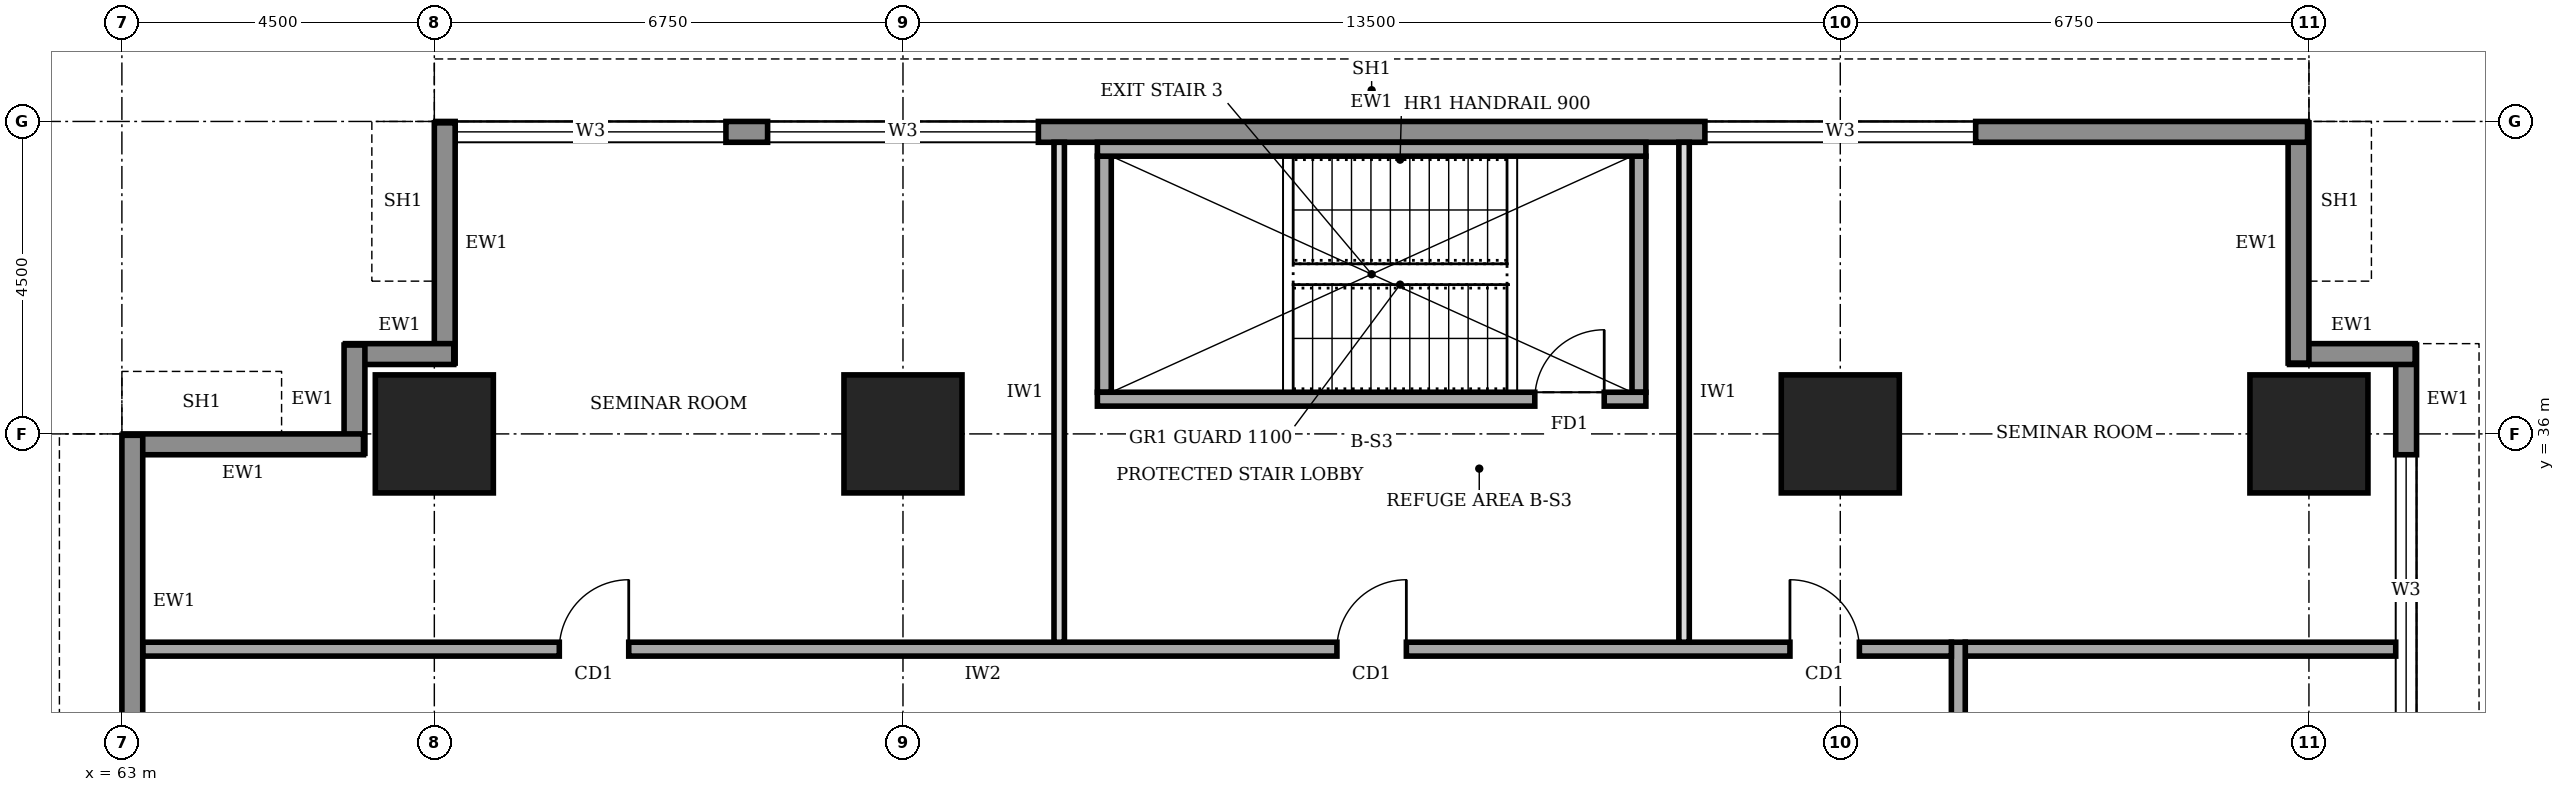
"""IFC4 building model, lengths in metres.
Left out: names, types, materials, properties, quantities, classifications, styles, units other than length and angle.
Written with IfcOpenShell. Run it as: python <this file> out.ifc"""

import sys

from ifc_helpers import new_model, si_unit, direction, frame, frame_2d, origin, origin_2d, place, context, subcontext, project, spatial, rectangle, extrude, element, fill, save


model = new_model("IFC4")
c1 = context("Model", 3, precision=1e-05, world=origin(), true_north=direction((0.0, 1.0)))
c2 = subcontext(c1, "Body", "Model", "MODEL_VIEW")
j1 = project(units=[si_unit("LENGTHUNIT", "METRE"), si_unit("PLANEANGLEUNIT", "RADIAN")], contexts=[c1])
p1 = place(None, origin())
s1 = spatial("IfcSite", under=j1, at=p1, CompositionType="ELEMENT")
p2 = place(p1, origin())
s2 = spatial("IfcBuilding", under=s1, at=p2, CompositionType="ELEMENT")
p3 = place(p2, frame((0.0, 0.0, 89.0)))
s3 = spatial("IfcBuildingStorey", under=s2, at=p3, CompositionType="ELEMENT", Elevation=89.0)
for number, where, z_axis, x_axis in (
    (1, (67.5, 36.0, 0.0), (0.0, 0.0, 1.0), (1.0, 0.0, 0.0)),
    (2, (74.25, 36.0, 0.0), (0.0, 0.0, 1.0), (1.0, 0.0, 0.0)),
    (3, (87.75, 36.0, 0.0), (0.0, 0.0, 1.0), (1.0, 0.0, 0.0)),
    (4, (94.5, 36.0, 0.0), (0.0, 0.0, 1.0), (1.0, 0.0, 0.0)),
):
    element("IfcColumn", number, at=place(p3, frame(where, z_axis=z_axis, x_axis=x_axis)), inside=s3, PredefinedType="COLUMN", context=c2, shape_type="SweptSolid", body=[
        extrude(rectangle(XDim=1.7, YDim=1.7, at=origin_2d()), origin(), (0.0, 0.0, 1.0), 4.0),
    ])
p4 = place(p3, frame((95.9, 3.32, 0.0), z_axis=(0.0, 0.0, 1.0), x_axis=(0.0, 1.0, 0.0)))
e5 = element("IfcWall", 5, at=p4, inside=s3, PredefinedType="STANDARD", context=c2, shape_type="SweptSolid", body=[
    extrude(rectangle(XDim=33.96, YDim=0.3, at=frame_2d((16.98, 0.0))), origin(), (0.0, 0.0, 1.0), 3.75),
])
p5 = place(p4, frame((1.48, 0.0, 0.95)))
e6 = element("IfcOpeningElement", 6, at=p5, cuts=e5, PredefinedType="OPENING", context=c2, shape_type="SweptSolid", body=[
    extrude(rectangle(XDim=3.9, YDim=1.8, at=frame_2d((1.95, 0.9))), frame((0.0, 0.16, 0.0), z_axis=(0.0, -1.0, 0.0), x_axis=(1.0, 0.0, 0.0)), (0.0, 0.0, 1.0), 0.32),
])
p6 = place(p4, frame((5.98, 0.0, 0.95)))
e7 = element("IfcOpeningElement", 7, at=p6, cuts=e5, PredefinedType="OPENING", context=c2, shape_type="SweptSolid", body=[
    extrude(rectangle(XDim=3.9, YDim=1.8, at=frame_2d((1.95, 0.9))), frame((0.0, 0.16, 0.0), z_axis=(0.0, -1.0, 0.0), x_axis=(1.0, 0.0, 0.0)), (0.0, 0.0, 1.0), 0.32),
])
p7 = place(p4, frame((10.48, 0.0, 0.95)))
e8 = element("IfcOpeningElement", 8, at=p7, cuts=e5, PredefinedType="OPENING", context=c2, shape_type="SweptSolid", body=[
    extrude(rectangle(XDim=3.9, YDim=1.8, at=frame_2d((1.95, 0.9))), frame((0.0, 0.16, 0.0), z_axis=(0.0, -1.0, 0.0), x_axis=(1.0, 0.0, 0.0)), (0.0, 0.0, 1.0), 0.32),
])
p8 = place(p4, frame((14.98, 0.0, 0.95)))
e9 = element("IfcOpeningElement", 9, at=p8, cuts=e5, PredefinedType="OPENING", context=c2, shape_type="SweptSolid", body=[
    extrude(rectangle(XDim=3.9, YDim=1.8, at=frame_2d((1.95, 0.9))), frame((0.0, 0.16, 0.0), z_axis=(0.0, -1.0, 0.0), x_axis=(1.0, 0.0, 0.0)), (0.0, 0.0, 1.0), 0.32),
])
p9 = place(p4, frame((19.48, 0.0, 0.95)))
e10 = element("IfcOpeningElement", 10, at=p9, cuts=e5, PredefinedType="OPENING", context=c2, shape_type="SweptSolid", body=[
    extrude(rectangle(XDim=3.9, YDim=1.8, at=frame_2d((1.95, 0.9))), frame((0.0, 0.16, 0.0), z_axis=(0.0, -1.0, 0.0), x_axis=(1.0, 0.0, 0.0)), (0.0, 0.0, 1.0), 0.32),
])
p10 = place(p4, frame((23.98, 0.0, 0.95)))
e11 = element("IfcOpeningElement", 11, at=p10, cuts=e5, PredefinedType="OPENING", context=c2, shape_type="SweptSolid", body=[
    extrude(rectangle(XDim=3.9, YDim=1.8, at=frame_2d((1.95, 0.9))), frame((0.0, 0.16, 0.0), z_axis=(0.0, -1.0, 0.0), x_axis=(1.0, 0.0, 0.0)), (0.0, 0.0, 1.0), 0.32),
])
p11 = place(p4, frame((28.48, 0.0, 0.95)))
e12 = element("IfcOpeningElement", 12, at=p11, cuts=e5, PredefinedType="OPENING", context=c2, shape_type="SweptSolid", body=[
    extrude(rectangle(XDim=3.9, YDim=1.8, at=frame_2d((1.95, 0.9))), frame((0.0, 0.16, 0.0), z_axis=(0.0, -1.0, 0.0), x_axis=(1.0, 0.0, 0.0)), (0.0, 0.0, 1.0), 0.32),
])
p12 = place(p3, frame((96.03, 37.15, 0.0), z_axis=(0.0, 0.0, 1.0), x_axis=(-1.0, 0.0, 0.0)))
e13 = element("IfcWall", 13, at=p12, inside=s3, PredefinedType="STANDARD", context=c2, shape_type="SweptSolid", body=[
    extrude(rectangle(XDim=1.81, YDim=0.3, at=frame_2d((0.905, 0.0))), origin(), (0.0, 0.0, 1.0), 3.75),
])
p13 = place(p3, frame((94.35, 37.02, 0.0), z_axis=(0.0, 0.0, 1.0), x_axis=(0.0, 1.0, 0.0)))
e14 = element("IfcWall", 14, at=p13, inside=s3, PredefinedType="STANDARD", context=c2, shape_type="SweptSolid", body=[
    extrude(rectangle(XDim=3.46, YDim=0.3, at=frame_2d((1.73, 0.0))), origin(), (0.0, 0.0, 1.0), 2.85),
])
p14 = place(p3, frame((94.48, 40.35, 0.0), z_axis=(0.0, 0.0, 1.0), x_axis=(-1.0, 0.0, 0.0)))
e15 = element("IfcWall", 15, at=p14, inside=s3, PredefinedType="STANDARD", context=c2, shape_type="SweptSolid", body=[
    extrude(rectangle(XDim=26.96, YDim=0.3, at=frame_2d((13.48, 0.0))), origin(), (0.0, 0.0, 1.0), 3.75),
])
p15 = place(p14, frame((22.78, 0.0, 0.95)))
e16 = element("IfcOpeningElement", 16, at=p15, cuts=e15, PredefinedType="OPENING", context=c2, shape_type="SweptSolid", body=[
    extrude(rectangle(XDim=3.9, YDim=1.8, at=frame_2d((1.95, 0.9))), frame((0.0, 0.16, 0.0), z_axis=(0.0, -1.0, 0.0), x_axis=(1.0, 0.0, 0.0)), (0.0, 0.0, 1.0), 0.32),
])
p16 = place(p14, frame((18.28, 0.0, 0.95)))
e17 = element("IfcOpeningElement", 17, at=p16, cuts=e15, PredefinedType="OPENING", context=c2, shape_type="SweptSolid", body=[
    extrude(rectangle(XDim=3.9, YDim=1.8, at=frame_2d((1.95, 0.9))), frame((0.0, 0.16, 0.0), z_axis=(0.0, -1.0, 0.0), x_axis=(1.0, 0.0, 0.0)), (0.0, 0.0, 1.0), 0.32),
])
p17 = place(p14, frame((4.78, 0.0, 0.95)))
e18 = element("IfcOpeningElement", 18, at=p17, cuts=e15, PredefinedType="OPENING", context=c2, shape_type="SweptSolid", body=[
    extrude(rectangle(XDim=3.9, YDim=1.8, at=frame_2d((1.95, 0.9))), frame((0.0, 0.16, 0.0), z_axis=(0.0, -1.0, 0.0), x_axis=(1.0, 0.0, 0.0)), (0.0, 0.0, 1.0), 0.32),
])
p18 = place(p3, frame((67.65, 40.48, 0.0), z_axis=(0.0, 0.0, 1.0), x_axis=(0.0, -1.0, 0.0)))
e19 = element("IfcWall", 19, at=p18, inside=s3, PredefinedType="STANDARD", context=c2, shape_type="SweptSolid", body=[
    extrude(rectangle(XDim=3.46, YDim=0.3, at=frame_2d((1.73, 0.0))), origin(), (0.0, 0.0, 1.0), 2.85),
])
for number, where, z_axis, x_axis in (
    (20, (67.78, 37.15, 0.0), (0.0, 0.0, 1.0), (-1.0, 0.0, 0.0)),
    (21, (66.35, 37.28, 0.0), (0.0, 0.0, 1.0), (0.0, -1.0, 0.0)),
):
    element("IfcWall", number, at=place(p3, frame(where, z_axis=z_axis, x_axis=x_axis)), inside=s3, PredefinedType="STANDARD", context=c2, shape_type="SweptSolid", body=[
        extrude(rectangle(XDim=1.56, YDim=0.3, at=frame_2d((0.78, 0.0))), origin(), (0.0, 0.0, 1.0), 3.75),
    ])
p19 = place(p3, frame((66.48, 35.85, 0.0), z_axis=(0.0, 0.0, 1.0), x_axis=(-1.0, 0.0, 0.0)))
e22 = element("IfcWall", 22, at=p19, inside=s3, PredefinedType="STANDARD", context=c2, shape_type="SweptSolid", body=[
    extrude(rectangle(XDim=3.46, YDim=0.3, at=frame_2d((1.73, 0.0))), origin(), (0.0, 0.0, 1.0), 2.85),
])
p20 = place(p3, frame((63.15, 35.98, 0.0), z_axis=(0.0, 0.0, 1.0), x_axis=(0.0, -1.0, 0.0)))
e23 = element("IfcWall", 23, at=p20, inside=s3, PredefinedType="STANDARD", context=c2, shape_type="SweptSolid", body=[
    extrude(rectangle(XDim=31.46, YDim=0.3, at=frame_2d((15.73, 0.0))), origin(), (0.0, 0.0, 1.0), 3.75),
])
p21 = place(p20, frame((27.28, 0.0, 0.95)))
e24 = element("IfcOpeningElement", 24, at=p21, cuts=e23, PredefinedType="OPENING", context=c2, shape_type="SweptSolid", body=[
    extrude(rectangle(XDim=3.9, YDim=1.8, at=frame_2d((1.95, 0.9))), frame((0.0, 0.16, 0.0), z_axis=(0.0, -1.0, 0.0), x_axis=(1.0, 0.0, 0.0)), (0.0, 0.0, 1.0), 0.32),
])
p22 = place(p20, frame((22.78, 0.0, 0.95)))
e25 = element("IfcOpeningElement", 25, at=p22, cuts=e23, PredefinedType="OPENING", context=c2, shape_type="SweptSolid", body=[
    extrude(rectangle(XDim=3.9, YDim=1.8, at=frame_2d((1.95, 0.9))), frame((0.0, 0.16, 0.0), z_axis=(0.0, -1.0, 0.0), x_axis=(1.0, 0.0, 0.0)), (0.0, 0.0, 1.0), 0.32),
])
p23 = place(p20, frame((18.28, 0.0, 0.95)))
e26 = element("IfcOpeningElement", 26, at=p23, cuts=e23, PredefinedType="OPENING", context=c2, shape_type="SweptSolid", body=[
    extrude(rectangle(XDim=3.9, YDim=1.8, at=frame_2d((1.95, 0.9))), frame((0.0, 0.16, 0.0), z_axis=(0.0, -1.0, 0.0), x_axis=(1.0, 0.0, 0.0)), (0.0, 0.0, 1.0), 0.32),
])
p24 = place(p20, frame((13.78, 0.0, 0.95)))
e27 = element("IfcOpeningElement", 27, at=p24, cuts=e23, PredefinedType="OPENING", context=c2, shape_type="SweptSolid", body=[
    extrude(rectangle(XDim=3.9, YDim=1.8, at=frame_2d((1.95, 0.9))), frame((0.0, 0.16, 0.0), z_axis=(0.0, -1.0, 0.0), x_axis=(1.0, 0.0, 0.0)), (0.0, 0.0, 1.0), 0.32),
])
p25 = place(p20, frame((9.28, 0.0, 0.95)))
e28 = element("IfcOpeningElement", 28, at=p25, cuts=e23, PredefinedType="OPENING", context=c2, shape_type="SweptSolid", body=[
    extrude(rectangle(XDim=3.9, YDim=1.8, at=frame_2d((1.95, 0.9))), frame((0.0, 0.16, 0.0), z_axis=(0.0, -1.0, 0.0), x_axis=(1.0, 0.0, 0.0)), (0.0, 0.0, 1.0), 0.32),
])
p26 = place(p20, frame((4.78, 0.0, 0.95)))
e29 = element("IfcOpeningElement", 29, at=p26, cuts=e23, PredefinedType="OPENING", context=c2, shape_type="SweptSolid", body=[
    extrude(rectangle(XDim=3.9, YDim=1.8, at=frame_2d((1.95, 0.9))), frame((0.0, 0.16, 0.0), z_axis=(0.0, -1.0, 0.0), x_axis=(1.0, 0.0, 0.0)), (0.0, 0.0, 1.0), 0.32),
])
p27 = place(p3, frame((89.45, 7.7, 0.0), z_axis=(0.0, 0.0, 1.0), x_axis=(0.0, 1.0, 0.0)))
e30 = element("IfcWall", 30, at=p27, inside=s3, PredefinedType="SOLIDWALL", context=c2, shape_type="SweptSolid", body=[
    extrude(rectangle(XDim=25.3, YDim=0.2, at=frame_2d((12.65, 0.0))), origin(), (0.0, 0.0, 1.0), 3.75),
])
p28 = place(p27, frame((2.3, 0.0, 0.0)))
e31 = element("IfcOpeningElement", 31, at=p28, cuts=e30, PredefinedType="OPENING", context=c2, shape_type="SweptSolid", body=[
    extrude(rectangle(XDim=1.0, YDim=2.1, at=frame_2d((0.5, 1.05))), frame((0.0, 0.11, 0.0), z_axis=(0.0, -1.0, 0.0), x_axis=(1.0, 0.0, 0.0)), (0.0, 0.0, 1.0), 0.22),
])
p29 = place(p27, frame((6.4, 0.0, 0.0)))
e32 = element("IfcOpeningElement", 32, at=p29, cuts=e30, PredefinedType="OPENING", context=c2, shape_type="SweptSolid", body=[
    extrude(rectangle(XDim=1.0, YDim=2.1, at=frame_2d((0.5, 1.05))), frame((0.0, 0.11, 0.0), z_axis=(0.0, -1.0, 0.0), x_axis=(1.0, 0.0, 0.0)), (0.0, 0.0, 1.0), 0.22),
])
p30 = place(p27, frame((9.5, 0.0, 0.0)))
e33 = element("IfcOpeningElement", 33, at=p30, cuts=e30, PredefinedType="OPENING", context=c2, shape_type="SweptSolid", body=[
    extrude(rectangle(XDim=0.9, YDim=2.1, at=frame_2d((0.45, 1.05))), frame((0.0, 0.11, 0.0), z_axis=(0.0, -1.0, 0.0), x_axis=(1.0, 0.0, 0.0)), (0.0, 0.0, 1.0), 0.22),
])
p31 = place(p27, frame((12.55, 0.0, 0.0)))
e34 = element("IfcOpeningElement", 34, at=p31, cuts=e30, PredefinedType="OPENING", context=c2, shape_type="SweptSolid", body=[
    extrude(rectangle(XDim=0.9, YDim=2.1, at=frame_2d((0.45, 1.05))), frame((0.0, 0.11, 0.0), z_axis=(0.0, -1.0, 0.0), x_axis=(1.0, 0.0, 0.0)), (0.0, 0.0, 1.0), 0.22),
])
p32 = place(p27, frame((17.25, 0.0, 0.0)))
e35 = element("IfcOpeningElement", 35, at=p32, cuts=e30, PredefinedType="OPENING", context=c2, shape_type="SweptSolid", body=[
    extrude(rectangle(XDim=0.9, YDim=2.1, at=frame_2d((0.45, 1.05))), frame((0.0, 0.11, 0.0), z_axis=(0.0, -1.0, 0.0), x_axis=(1.0, 0.0, 0.0)), (0.0, 0.0, 1.0), 0.22),
])
p33 = place(p27, frame((14.6, 0.0, 0.0)))
e36 = element("IfcOpeningElement", 36, at=p33, cuts=e30, PredefinedType="OPENING", context=c2, shape_type="SweptSolid", body=[
    extrude(rectangle(XDim=1.0, YDim=2.1, at=frame_2d((0.5, 1.05))), frame((0.0, 0.11, 0.0), z_axis=(0.0, -1.0, 0.0), x_axis=(1.0, 0.0, 0.0)), (0.0, 0.0, 1.0), 0.22),
])
p34 = place(p27, frame((21.8, 0.0, 0.0)))
e37 = element("IfcOpeningElement", 37, at=p34, cuts=e30, PredefinedType="OPENING", context=c2, shape_type="SweptSolid", body=[
    extrude(rectangle(XDim=1.0, YDim=2.1, at=frame_2d((0.5, 1.05))), frame((0.0, 0.11, 0.0), z_axis=(0.0, -1.0, 0.0), x_axis=(1.0, 0.0, 0.0)), (0.0, 0.0, 1.0), 0.22),
])
p35 = place(p3, frame((89.35, 32.9, 0.0), z_axis=(0.0, 0.0, 1.0), x_axis=(-1.0, 0.0, 0.0)))
e38 = element("IfcWall", 38, at=p35, inside=s3, PredefinedType="SOLIDWALL", context=c2, shape_type="SweptSolid", body=[
    extrude(rectangle(XDim=26.05, YDim=0.2, at=frame_2d((13.025, 0.0))), origin(), (0.0, 0.0, 1.0), 3.75),
])
p36 = place(p35, frame((19.05, 0.0, 0.0)))
e39 = element("IfcOpeningElement", 39, at=p36, cuts=e38, PredefinedType="OPENING", context=c2, shape_type="SweptSolid", body=[
    extrude(rectangle(XDim=1.0, YDim=2.1, at=frame_2d((0.5, 1.05))), frame((0.0, 0.11, 0.0), z_axis=(0.0, -1.0, 0.0), x_axis=(1.0, 0.0, 0.0)), (0.0, 0.0, 1.0), 0.22),
])
p37 = place(p35, frame((7.85, 0.0, 0.0)))
e40 = element("IfcOpeningElement", 40, at=p37, cuts=e38, PredefinedType="OPENING", context=c2, shape_type="SweptSolid", body=[
    extrude(rectangle(XDim=1.0, YDim=2.1, at=frame_2d((0.5, 1.05))), frame((0.0, 0.11, 0.0), z_axis=(0.0, -1.0, 0.0), x_axis=(1.0, 0.0, 0.0)), (0.0, 0.0, 1.0), 0.22),
])
p38 = place(p35, frame((1.325, 0.0, 0.0)))
e41 = element("IfcOpeningElement", 41, at=p38, cuts=e38, PredefinedType="OPENING", context=c2, shape_type="SweptSolid", body=[
    extrude(rectangle(XDim=1.0, YDim=2.1, at=frame_2d((0.5, 1.05))), frame((0.0, 0.11, 0.0), z_axis=(0.0, -1.0, 0.0), x_axis=(1.0, 0.0, 0.0)), (0.0, 0.0, 1.0), 0.22),
])
p39 = place(p3, frame((89.55, 32.9, 0.0), z_axis=(0.0, 0.0, 1.0), x_axis=(1.0, 0.0, 0.0)))
e42 = element("IfcWall", 42, at=p39, inside=s3, PredefinedType="SOLIDWALL", context=c2, shape_type="SweptSolid", body=[
    extrude(rectangle(XDim=6.2, YDim=0.2, at=frame_2d((3.1, 0.0))), origin(), (0.0, 0.0, 1.0), 3.75),
])
for number, where, z_axis, x_axis in (
    (43, (76.5, 33.0, 0.0), (0.0, 0.0, 1.0), (0.0, 1.0, 0.0)),
    (44, (85.5, 33.0, 0.0), (0.0, 0.0, 1.0), (0.0, 1.0, 0.0)),
):
    element("IfcWall", number, at=place(p3, frame(where, z_axis=z_axis, x_axis=x_axis)), inside=s3, PredefinedType="PARTITIONING", context=c2, shape_type="SweptSolid", body=[
        extrude(rectangle(XDim=7.2, YDim=0.15, at=frame_2d((3.6, 0.0))), origin(), (0.0, 0.0, 1.0), 3.75),
    ])
p40 = place(p3, frame((77.05, 36.5, 0.0), z_axis=(0.0, 0.0, 1.0), x_axis=(1.0, 0.0, 0.0)))
e45 = element("IfcWall", 45, at=p40, inside=s3, PredefinedType="SOLIDWALL", context=c2, shape_type="SweptSolid", body=[
    extrude(rectangle(XDim=7.9, YDim=0.2, at=frame_2d((3.95, 0.0))), origin(), (0.0, 0.0, 1.0), 3.75),
])
p41 = place(p40, frame((6.3, 0.0, 0.0)))
e46 = element("IfcOpeningElement", 46, at=p41, cuts=e45, PredefinedType="OPENING", context=c2, shape_type="SweptSolid", body=[
    extrude(rectangle(XDim=1.0, YDim=2.1, at=frame_2d((0.5, 1.05))), frame((0.0, 0.11, 0.0), z_axis=(0.0, -1.0, 0.0), x_axis=(1.0, 0.0, 0.0)), (0.0, 0.0, 1.0), 0.22),
])
p42 = place(p3, frame((77.05, 40.1, 0.0), z_axis=(0.0, 0.0, 1.0), x_axis=(1.0, 0.0, 0.0)))
e47 = element("IfcWall", 47, at=p42, inside=s3, PredefinedType="SOLIDWALL", context=c2, shape_type="SweptSolid", body=[
    extrude(rectangle(XDim=7.9, YDim=0.2, at=frame_2d((3.95, 0.0))), origin(), (0.0, 0.0, 1.0), 3.75),
])
for number, where, z_axis, x_axis in (
    (48, (77.15, 36.6, 0.0), (0.0, 0.0, 1.0), (0.0, 1.0, 0.0)),
    (49, (84.85, 36.6, 0.0), (0.0, 0.0, 1.0), (0.0, 1.0, 0.0)),
):
    element("IfcWall", number, at=place(p3, frame(where, z_axis=z_axis, x_axis=x_axis)), inside=s3, PredefinedType="SOLIDWALL", context=c2, shape_type="SweptSolid", body=[
        extrude(rectangle(XDim=3.4, YDim=0.2, at=frame_2d((1.7, 0.0))), origin(), (0.0, 0.0, 1.0), 3.75),
    ])
p43 = place(p11, origin())
e50 = element("IfcWindow", 50, at=p43, inside=s3, PartitioningType="SINGLE_PANEL", PredefinedType="WINDOW", context=c2, shape_type="SweptSolid", body=[
    extrude(rectangle(XDim=3.9, YDim=1.8, at=frame_2d((1.95, 0.9))), frame((0.0, 0.03, 0.0), z_axis=(0.0, -1.0, 0.0), x_axis=(1.0, 0.0, 0.0)), (0.0, 0.0, 1.0), 0.06),
])
fill(e12, e50)
p44 = place(p15, origin())
e51 = element("IfcWindow", 51, at=p44, inside=s3, PartitioningType="SINGLE_PANEL", PredefinedType="WINDOW", context=c2, shape_type="SweptSolid", body=[
    extrude(rectangle(XDim=3.9, YDim=1.8, at=frame_2d((1.95, 0.9))), frame((0.0, 0.03, 0.0), z_axis=(0.0, -1.0, 0.0), x_axis=(1.0, 0.0, 0.0)), (0.0, 0.0, 1.0), 0.06),
])
fill(e16, e51)
p45 = place(p16, origin())
e52 = element("IfcWindow", 52, at=p45, inside=s3, PartitioningType="SINGLE_PANEL", PredefinedType="WINDOW", context=c2, shape_type="SweptSolid", body=[
    extrude(rectangle(XDim=3.9, YDim=1.8, at=frame_2d((1.95, 0.9))), frame((0.0, 0.03, 0.0), z_axis=(0.0, -1.0, 0.0), x_axis=(1.0, 0.0, 0.0)), (0.0, 0.0, 1.0), 0.06),
])
fill(e17, e52)
p46 = place(p17, origin())
e53 = element("IfcWindow", 53, at=p46, inside=s3, PartitioningType="SINGLE_PANEL", PredefinedType="WINDOW", context=c2, shape_type="SweptSolid", body=[
    extrude(rectangle(XDim=3.9, YDim=1.8, at=frame_2d((1.95, 0.9))), frame((0.0, 0.03, 0.0), z_axis=(0.0, -1.0, 0.0), x_axis=(1.0, 0.0, 0.0)), (0.0, 0.0, 1.0), 0.06),
])
fill(e18, e53)
p47 = place(p36, frame((1.0, 0.0, 0.0), z_axis=(0.0, 0.0, 1.0), x_axis=(-1.0, 0.0, 0.0)))
e54 = element("IfcDoor", 54, at=p47, inside=s3, OperationType="SINGLE_SWING_RIGHT", PredefinedType="DOOR", context=c2, shape_type="SweptSolid", body=[
    extrude(rectangle(XDim=1.0, YDim=2.1, at=frame_2d((0.5, 1.05))), frame((0.0, 0.025, 0.0), z_axis=(0.0, -1.0, 0.0), x_axis=(1.0, 0.0, 0.0)), (0.0, 0.0, 1.0), 0.05),
])
fill(e39, e54)
p48 = place(p37, frame((1.0, 0.0, 0.0), z_axis=(0.0, 0.0, 1.0), x_axis=(-1.0, 0.0, 0.0)))
e55 = element("IfcDoor", 55, at=p48, inside=s3, OperationType="SINGLE_SWING_RIGHT", PredefinedType="DOOR", context=c2, shape_type="SweptSolid", body=[
    extrude(rectangle(XDim=1.0, YDim=2.1, at=frame_2d((0.5, 1.05))), frame((0.0, 0.025, 0.0), z_axis=(0.0, -1.0, 0.0), x_axis=(1.0, 0.0, 0.0)), (0.0, 0.0, 1.0), 0.05),
])
fill(e40, e55)
p49 = place(p38, frame((1.0, 0.0, 0.0), z_axis=(0.0, 0.0, 1.0), x_axis=(-1.0, 0.0, 0.0)))
e56 = element("IfcDoor", 56, at=p49, inside=s3, OperationType="SINGLE_SWING_LEFT", PredefinedType="DOOR", context=c2, shape_type="SweptSolid", body=[
    extrude(rectangle(XDim=1.0, YDim=2.1, at=frame_2d((0.5, 1.05))), frame((0.0, 0.025, 0.0), z_axis=(0.0, -1.0, 0.0), x_axis=(1.0, 0.0, 0.0)), (0.0, 0.0, 1.0), 0.05),
])
fill(e41, e56)
p50 = place(p41, origin())
e57 = element("IfcDoor", 57, at=p50, inside=s3, OperationType="SINGLE_SWING_RIGHT", PredefinedType="DOOR", context=c2, shape_type="SweptSolid", body=[
    extrude(rectangle(XDim=1.0, YDim=2.1, at=frame_2d((0.5, 1.05))), frame((0.0, 0.025, 0.0), z_axis=(0.0, -1.0, 0.0), x_axis=(1.0, 0.0, 0.0)), (0.0, 0.0, 1.0), 0.05),
])
fill(e46, e57)
save(model, sys.argv[1])
